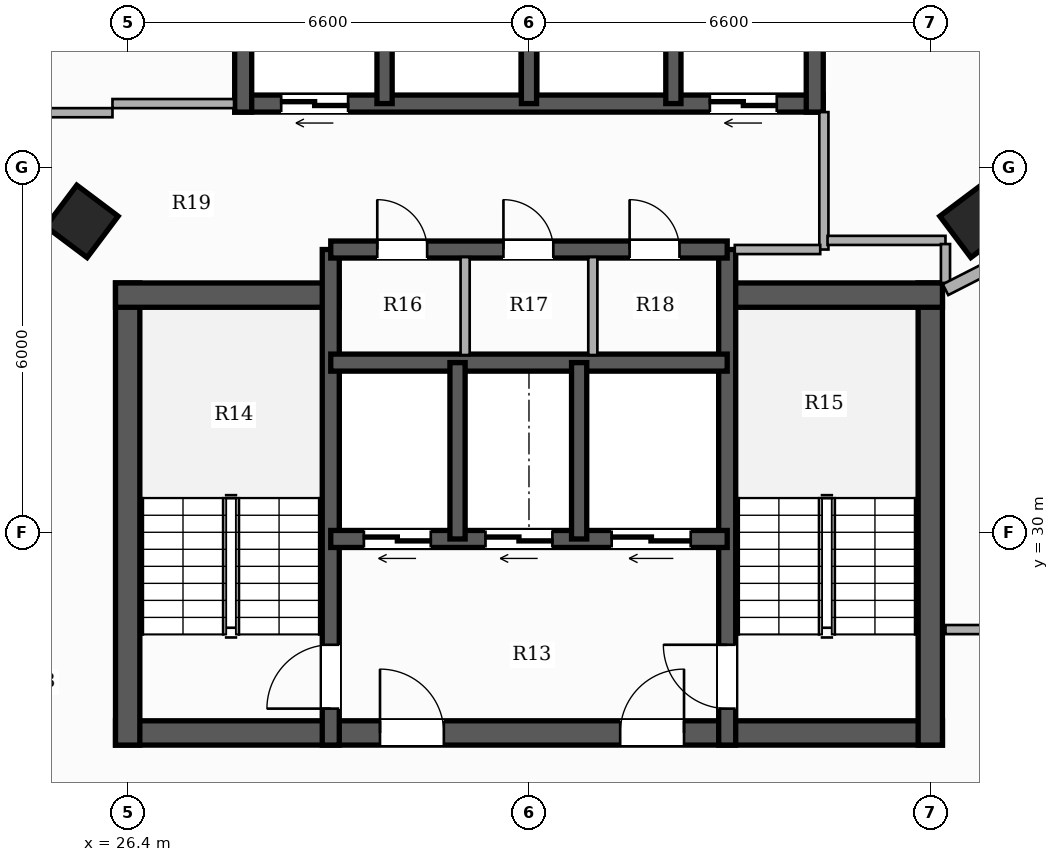
"""IFC4 building model, lengths in metres.
Left out: names, types, materials, properties, quantities, classifications, styles, units other than length and angle.
Written with IfcOpenShell. Run it as: python <this file> out.ifc"""

import sys

from ifc_helpers import new_model, si_unit, direction, frame, frame_2d, origin, origin_2d, place, context, subcontext, project, spatial, rectangle, hollow_rectangle, extrude, element, fill, save


model = new_model("IFC4")
c1 = context("Model", 3, precision=1e-05, world=origin(), true_north=direction((0.0, 1.0)))
c2 = subcontext(c1, "Body", "Model", "MODEL_VIEW")
j1 = project(units=[si_unit("LENGTHUNIT", "METRE"), si_unit("PLANEANGLEUNIT", "RADIAN")], contexts=[c1])
p1 = place(None, origin())
s1 = spatial("IfcSite", under=j1, at=p1, CompositionType="ELEMENT")
p2 = place(p1, origin())
s2 = spatial("IfcBuilding", under=s1, at=p2, CompositionType="ELEMENT")
p3 = place(p2, frame((0.0, 0.0, 126.5)))
s3 = spatial("IfcBuildingStorey", under=s2, at=p3, CompositionType="ELEMENT", Elevation=126.5)
p4 = place(p3, frame((26.2, 26.7, 0.0), z_axis=(0.0, 0.0, 1.0), x_axis=(1.0, 0.0, 0.0)))
e1 = element("IfcWall", 1, at=p4, inside=s3, PredefinedType="SHEAR", context=c2, shape_type="SweptSolid", body=[
    extrude(rectangle(XDim=13.6, YDim=0.4, at=frame_2d((6.8, 0.0))), origin(), (0.0, 0.0, 1.0), 3.3),
])
p5 = place(p4, frame((4.35, 0.0, 0.0)))
e2 = element("IfcOpeningElement", 2, at=p5, cuts=e1, PredefinedType="OPENING", context=c2, shape_type="SweptSolid", body=[
    extrude(rectangle(XDim=1.05, YDim=2.15, at=frame_2d((0.525, 1.075))), frame((0.0, 0.21, 0.0), z_axis=(0.0, -1.0, 0.0), x_axis=(1.0, 0.0, 0.0)), (0.0, 0.0, 1.0), 0.42),
])
p6 = place(p4, frame((8.3, 0.0, 0.0)))
e3 = element("IfcOpeningElement", 3, at=p6, cuts=e1, PredefinedType="OPENING", context=c2, shape_type="SweptSolid", body=[
    extrude(rectangle(XDim=1.05, YDim=2.15, at=frame_2d((0.525, 1.075))), frame((0.0, 0.21, 0.0), z_axis=(0.0, -1.0, 0.0), x_axis=(1.0, 0.0, 0.0)), (0.0, 0.0, 1.0), 0.42),
])
p7 = place(p3, frame((26.4, 26.5, 0.0), z_axis=(0.0, 0.0, 1.0), x_axis=(0.0, 1.0, 0.0)))
e4 = element("IfcWall", 4, at=p7, inside=s3, PredefinedType="SHEAR", context=c2, shape_type="SweptSolid", body=[
    extrude(rectangle(XDim=7.6, YDim=0.4, at=frame_2d((3.8, 0.0))), origin(), (0.0, 0.0, 1.0), 3.3),
])
p8 = place(p3, frame((26.2, 33.9, 0.0), z_axis=(0.0, 0.0, 1.0), x_axis=(1.0, 0.0, 0.0)))
e5 = element("IfcWall", 5, at=p8, inside=s3, PredefinedType="SHEAR", context=c2, shape_type="SweptSolid", body=[
    extrude(rectangle(XDim=3.68, YDim=0.4, at=frame_2d((1.84, 0.0))), origin(), (0.0, 0.0, 1.0), 3.3),
])
p9 = place(p3, frame((39.6, 26.5, 0.0), z_axis=(0.0, 0.0, 1.0), x_axis=(0.0, 1.0, 0.0)))
e6 = element("IfcWall", 6, at=p9, inside=s3, PredefinedType="SHEAR", context=c2, shape_type="SweptSolid", body=[
    extrude(rectangle(XDim=7.6, YDim=0.4, at=frame_2d((3.8, 0.0))), origin(), (0.0, 0.0, 1.0), 3.3),
])
p10 = place(p3, frame((36.12, 33.9, 0.0), z_axis=(0.0, 0.0, 1.0), x_axis=(1.0, 0.0, 0.0)))
e7 = element("IfcWall", 7, at=p10, inside=s3, PredefinedType="SHEAR", context=c2, shape_type="SweptSolid", body=[
    extrude(rectangle(XDim=3.68, YDim=0.4, at=frame_2d((1.84, 0.0))), origin(), (0.0, 0.0, 1.0), 3.3),
])
p11 = place(p3, frame((29.74, 26.5, 0.0), z_axis=(0.0, 0.0, 1.0), x_axis=(0.0, 1.0, 0.0)))
e8 = element("IfcWall", 8, at=p11, inside=s3, PredefinedType="SHEAR", context=c2, shape_type="SweptSolid", body=[
    extrude(rectangle(XDim=8.15, YDim=0.28, at=frame_2d((4.075, 0.0))), origin(), (0.0, 0.0, 1.0), 3.3),
])
p12 = place(p11, frame((0.6, 0.0, 0.0)))
e9 = element("IfcOpeningElement", 9, at=p12, cuts=e8, PredefinedType="OPENING", context=c2, shape_type="SweptSolid", body=[
    extrude(rectangle(XDim=1.05, YDim=2.15, at=frame_2d((0.525, 1.075))), frame((0.0, 0.15, 0.0), z_axis=(0.0, -1.0, 0.0), x_axis=(1.0, 0.0, 0.0)), (0.0, 0.0, 1.0), 0.3),
])
p13 = place(p3, frame((36.26, 26.5, 0.0), z_axis=(0.0, 0.0, 1.0), x_axis=(0.0, 1.0, 0.0)))
e10 = element("IfcWall", 10, at=p13, inside=s3, PredefinedType="SHEAR", context=c2, shape_type="SweptSolid", body=[
    extrude(rectangle(XDim=8.15, YDim=0.28, at=frame_2d((4.075, 0.0))), origin(), (0.0, 0.0, 1.0), 3.3),
])
p14 = place(p13, frame((0.6, 0.0, 0.0)))
e11 = element("IfcOpeningElement", 11, at=p14, cuts=e10, PredefinedType="OPENING", context=c2, shape_type="SweptSolid", body=[
    extrude(rectangle(XDim=1.05, YDim=2.15, at=frame_2d((0.525, 1.075))), frame((0.0, 0.15, 0.0), z_axis=(0.0, -1.0, 0.0), x_axis=(1.0, 0.0, 0.0)), (0.0, 0.0, 1.0), 0.3),
])
p15 = place(p3, frame((36.26, 29.89, 0.0), z_axis=(0.0, 0.0, 1.0), x_axis=(-1.0, 0.0, 0.0)))
e12 = element("IfcWall", 12, at=p15, inside=s3, PredefinedType="SHEAR", context=c2, shape_type="SweptSolid", body=[
    extrude(rectangle(XDim=6.52, YDim=0.28, at=frame_2d((3.26, 0.0))), origin(), (0.0, 0.0, 1.0), 3.3),
])
p16 = place(p15, frame((4.875, 0.0, 0.0)))
e13 = element("IfcOpeningElement", 13, at=p16, cuts=e12, PredefinedType="OPENING", context=c2, shape_type="SweptSolid", body=[
    extrude(rectangle(XDim=1.1, YDim=2.2, at=frame_2d((0.55, 1.1))), frame((0.0, 0.15, 0.0), z_axis=(0.0, -1.0, 0.0), x_axis=(1.0, 0.0, 0.0)), (0.0, 0.0, 1.0), 0.3),
])
p17 = place(p15, frame((2.875, 0.0, 0.0)))
e14 = element("IfcOpeningElement", 14, at=p17, cuts=e12, PredefinedType="OPENING", context=c2, shape_type="SweptSolid", body=[
    extrude(rectangle(XDim=1.1, YDim=2.2, at=frame_2d((0.55, 1.1))), frame((0.0, 0.15, 0.0), z_axis=(0.0, -1.0, 0.0), x_axis=(1.0, 0.0, 0.0)), (0.0, 0.0, 1.0), 0.3),
])
p18 = place(p15, frame((0.6, 0.0, 0.0)))
e15 = element("IfcOpeningElement", 15, at=p18, cuts=e12, PredefinedType="OPENING", context=c2, shape_type="SweptSolid", body=[
    extrude(rectangle(XDim=1.3, YDim=2.2, at=frame_2d((0.65, 1.1))), frame((0.0, 0.15, 0.0), z_axis=(0.0, -1.0, 0.0), x_axis=(1.0, 0.0, 0.0)), (0.0, 0.0, 1.0), 0.3),
])
p19 = place(p3, frame((29.74, 32.79, 0.0), z_axis=(0.0, 0.0, 1.0), x_axis=(1.0, 0.0, 0.0)))
e16 = element("IfcWall", 16, at=p19, inside=s3, PredefinedType="SHEAR", context=c2, shape_type="SweptSolid", body=[
    extrude(rectangle(XDim=6.52, YDim=0.28, at=frame_2d((3.26, 0.0))), origin(), (0.0, 0.0, 1.0), 3.3),
])
for number, where, z_axis, x_axis in (
    (17, (31.825, 29.89, 0.0), (0.0, 0.0, 1.0), (0.0, 1.0, 0.0)),
    (18, (33.825, 29.89, 0.0), (0.0, 0.0, 1.0), (0.0, 1.0, 0.0)),
):
    element("IfcWall", number, at=place(p3, frame(where, z_axis=z_axis, x_axis=x_axis)), inside=s3, PredefinedType="SHEAR", context=c2, shape_type="SweptSolid", body=[
        extrude(rectangle(XDim=2.9, YDim=0.25, at=frame_2d((1.45, 0.0))), origin(), (0.0, 0.0, 1.0), 3.3),
    ])
p20 = place(p3, frame((29.74, 34.65, 0.0), z_axis=(0.0, 0.0, 1.0), x_axis=(1.0, 0.0, 0.0)))
e19 = element("IfcWall", 19, at=p20, inside=s3, PredefinedType="SHEAR", context=c2, shape_type="SweptSolid", body=[
    extrude(rectangle(XDim=6.52, YDim=0.28, at=frame_2d((3.26, 0.0))), origin(), (0.0, 0.0, 1.0), 3.3),
])
p21 = place(p20, frame((0.765, 0.0, 0.0)))
e20 = element("IfcOpeningElement", 20, at=p21, cuts=e19, PredefinedType="OPENING", context=c2, shape_type="SweptSolid", body=[
    extrude(rectangle(XDim=0.82, YDim=2.1, at=frame_2d((0.41, 1.05))), frame((0.0, 0.15, 0.0), z_axis=(0.0, -1.0, 0.0), x_axis=(1.0, 0.0, 0.0)), (0.0, 0.0, 1.0), 0.3),
])
p22 = place(p20, frame((2.84, 0.0, 0.0)))
e21 = element("IfcOpeningElement", 21, at=p22, cuts=e19, PredefinedType="OPENING", context=c2, shape_type="SweptSolid", body=[
    extrude(rectangle(XDim=0.82, YDim=2.1, at=frame_2d((0.41, 1.05))), frame((0.0, 0.15, 0.0), z_axis=(0.0, -1.0, 0.0), x_axis=(1.0, 0.0, 0.0)), (0.0, 0.0, 1.0), 0.3),
])
p23 = place(p20, frame((4.915, 0.0, 0.0)))
e22 = element("IfcOpeningElement", 22, at=p23, cuts=e19, PredefinedType="OPENING", context=c2, shape_type="SweptSolid", body=[
    extrude(rectangle(XDim=0.82, YDim=2.1, at=frame_2d((0.41, 1.05))), frame((0.0, 0.15, 0.0), z_axis=(0.0, -1.0, 0.0), x_axis=(1.0, 0.0, 0.0)), (0.0, 0.0, 1.0), 0.3),
])
p24 = place(p3, frame((37.84, 37.05, 0.0), z_axis=(0.0, 0.0, 1.0), x_axis=(-1.0, 0.0, 0.0)))
e23 = element("IfcWall", 23, at=p24, inside=s3, PredefinedType="SHEAR", context=c2, shape_type="SweptSolid", body=[
    extrude(rectangle(XDim=9.68, YDim=0.28, at=frame_2d((4.84, 0.0))), origin(), (0.0, 0.0, 1.0), 3.3),
])
p25 = place(p24, frame((7.815, 0.0, 0.0)))
e24 = element("IfcOpeningElement", 24, at=p25, cuts=e23, PredefinedType="OPENING", context=c2, shape_type="SweptSolid", body=[
    extrude(rectangle(XDim=1.1, YDim=2.2, at=frame_2d((0.55, 1.1))), frame((0.0, 0.15, 0.0), z_axis=(0.0, -1.0, 0.0), x_axis=(1.0, 0.0, 0.0)), (0.0, 0.0, 1.0), 0.3),
])
p26 = place(p24, frame((0.765, 0.0, 0.0)))
e25 = element("IfcOpeningElement", 25, at=p26, cuts=e23, PredefinedType="OPENING", context=c2, shape_type="SweptSolid", body=[
    extrude(rectangle(XDim=1.1, YDim=2.2, at=frame_2d((0.55, 1.1))), frame((0.0, 0.15, 0.0), z_axis=(0.0, -1.0, 0.0), x_axis=(1.0, 0.0, 0.0)), (0.0, 0.0, 1.0), 0.3),
])
for number, where, z_axis, x_axis in (
    (26, (28.3, 36.91, 0.0), (0.0, 0.0, 1.0), (0.0, 1.0, 0.0)),
    (27, (37.7, 36.91, 0.0), (0.0, 0.0, 1.0), (0.0, 1.0, 0.0)),
):
    element("IfcWall", number, at=place(p3, frame(where, z_axis=z_axis, x_axis=x_axis)), inside=s3, PredefinedType="SHEAR", context=c2, shape_type="SweptSolid", body=[
        extrude(rectangle(XDim=2.83, YDim=0.28, at=frame_2d((1.415, 0.0))), origin(), (0.0, 0.0, 1.0), 3.3),
    ])
for number, where, z_axis, x_axis in (
    (28, (30.625, 37.05, 0.0), (0.0, 0.0, 1.0), (0.0, 1.0, 0.0)),
    (29, (33.0, 37.05, 0.0), (0.0, 0.0, 1.0), (0.0, 1.0, 0.0)),
    (30, (35.375, 37.05, 0.0), (0.0, 0.0, 1.0), (0.0, 1.0, 0.0)),
):
    element("IfcWall", number, at=place(p3, frame(where, z_axis=z_axis, x_axis=x_axis)), inside=s3, PredefinedType="SHEAR", context=c2, shape_type="SweptSolid", body=[
        extrude(rectangle(XDim=2.55, YDim=0.25, at=frame_2d((1.275, 0.0))), origin(), (0.0, 0.0, 1.0), 3.3),
    ])
for number, where, z_axis, x_axis in (
    (31, (25.648, 35.113, 0.0), (0.0, 0.0, 1.0), (0.6, 0.8, 0.0)),
    (32, (40.352, 35.113, 0.0), (0.0, 0.0, 1.0), (-0.6, 0.8, 0.0)),
):
    element("IfcColumn", number, at=place(p3, frame(where, z_axis=z_axis, x_axis=x_axis)), inside=s3, PredefinedType="COLUMN", context=c2, shape_type="SweptSolid", body=[
        extrude(hollow_rectangle(XDim=0.85, YDim=0.85, WallThickness=0.028, at=origin_2d()), origin(), (0.0, 0.0, 1.0), 3.3),
    ])
p27 = place(p3, frame((37.85, 34.65, 0.0), z_axis=(0.0, 0.0, 1.0), x_axis=(0.0, 1.0, 0.0)))
e33 = element("IfcWall", 33, at=p27, inside=s3, PredefinedType="PARTITIONING", context=c2, shape_type="SweptSolid", body=[
    extrude(rectangle(XDim=2.26, YDim=0.15, at=frame_2d((1.13, 0.0))), origin(), (0.0, 0.0, 1.0), 3.06),
])
p28 = place(p3, frame((36.385, 34.65, 0.0), z_axis=(0.0, 0.0, 1.0), x_axis=(1.0, 0.0, 0.0)))
e34 = element("IfcWall", 34, at=p28, inside=s3, PredefinedType="PARTITIONING", context=c2, shape_type="SweptSolid", body=[
    extrude(rectangle(XDim=1.405, YDim=0.15, at=frame_2d((0.703, 0.0))), origin(), (0.0, 0.0, 1.0), 2.425),
])
for number, where, z_axis, x_axis in (
    (35, (31.95, 32.915, 0.0), (0.0, 0.0, 1.0), (0.0, 1.0, 0.0)),
    (36, (34.05, 32.915, 0.0), (0.0, 0.0, 1.0), (0.0, 1.0, 0.0)),
):
    element("IfcWall", number, at=place(p3, frame(where, z_axis=z_axis, x_axis=x_axis)), inside=s3, PredefinedType="PARTITIONING", context=c2, shape_type="SweptSolid", body=[
        extrude(rectangle(XDim=1.61, YDim=0.15, at=frame_2d((0.805, 0.0))), origin(), (0.0, 0.0, 1.0), 3.06),
    ])
p29 = place(p3, frame((23.56, 36.9, 0.0), z_axis=(0.0, 0.0, 1.0), x_axis=(1.0, 0.0, 0.0)))
e37 = element("IfcWall", 37, at=p29, inside=s3, PredefinedType="PARTITIONING", context=c2, shape_type="SweptSolid", body=[
    extrude(rectangle(XDim=2.59, YDim=0.15, at=frame_2d((1.295, 0.0))), origin(), (0.0, 0.0, 1.0), 2.413),
])
p30 = place(p29, frame((0.515, 0.0, 0.0)))
e38 = element("IfcOpeningElement", 38, at=p30, cuts=e37, PredefinedType="OPENING", context=c2, shape_type="SweptSolid", body=[
    extrude(rectangle(XDim=0.88, YDim=2.1, at=frame_2d((0.44, 1.05))), frame((0.0, 0.085, 0.0), z_axis=(0.0, -1.0, 0.0), x_axis=(1.0, 0.0, 0.0)), (0.0, 0.0, 1.0), 0.17),
])
p31 = place(p3, frame((39.85, 28.4, 0.0), z_axis=(0.0, 0.0, 1.0), x_axis=(1.0, 0.0, 0.0)))
e39 = element("IfcWall", 39, at=p31, inside=s3, PredefinedType="PARTITIONING", context=c2, shape_type="SweptSolid", body=[
    extrude(rectangle(XDim=2.5, YDim=0.15, at=frame_2d((1.25, 0.0))), origin(), (0.0, 0.0, 1.0), 2.721),
])
p32 = place(p3, frame((26.15, 37.05, 0.0), z_axis=(0.0, 0.0, 1.0), x_axis=(1.0, 0.0, 0.0)))
e40 = element("IfcWall", 40, at=p32, inside=s3, PredefinedType="PARTITIONING", context=c2, shape_type="SweptSolid", body=[
    extrude(rectangle(XDim=2.0, YDim=0.15, at=frame_2d((1.0, 0.0))), origin(), (0.0, 0.0, 1.0), 2.413),
])
p33 = place(p3, frame((37.91, 34.8, 0.0), z_axis=(0.0, 0.0, 1.0), x_axis=(1.0, 0.0, 0.0)))
e41 = element("IfcWall", 41, at=p33, inside=s3, PredefinedType="PARTITIONING", context=c2, shape_type="SweptSolid", body=[
    extrude(rectangle(XDim=1.94, YDim=0.15, at=frame_2d((0.97, 0.0))), origin(), (0.0, 0.0, 1.0), 2.721),
])
p34 = place(p3, frame((39.85, 34.74, 0.0), z_axis=(0.0, 0.0, 1.0), x_axis=(0.0, -1.0, 0.0)))
e42 = element("IfcWall", 42, at=p34, inside=s3, PredefinedType="PARTITIONING", context=c2, shape_type="SweptSolid", body=[
    extrude(rectangle(XDim=0.64, YDim=0.15, at=frame_2d((0.32, 0.0))), origin(), (0.0, 0.0, 1.0), 2.721),
])
p35 = place(p3, frame((44.359, 36.288, 0.0), z_axis=(0.0, 0.0, 1.0), x_axis=(-0.890946333403, -0.454108611453, 0.0)))
e43 = element("IfcWall", 43, at=p35, inside=s3, PredefinedType="PARTITIONING", context=c2, shape_type="SweptSolid", body=[
    extrude(rectangle(XDim=5.061, YDim=0.2, at=frame_2d((2.53, 0.0))), origin(), (0.0, 0.0, 1.0), 2.413),
])
p36 = place(p12, origin())
e44 = element("IfcDoor", 44, at=p36, inside=s3, OperationType="SINGLE_SWING_LEFT", PredefinedType="DOOR", context=c2, shape_type="SweptSolid", body=[
    extrude(rectangle(XDim=1.05, YDim=2.15, at=frame_2d((0.525, 1.075))), frame((0.0, 0.025, 0.0), z_axis=(0.0, -1.0, 0.0), x_axis=(1.0, 0.0, 0.0)), (0.0, 0.0, 1.0), 0.05),
])
fill(e9, e44)
p37 = place(p14, origin())
e45 = element("IfcDoor", 45, at=p37, inside=s3, OperationType="SINGLE_SWING_RIGHT", PredefinedType="DOOR", context=c2, shape_type="SweptSolid", body=[
    extrude(rectangle(XDim=1.05, YDim=2.15, at=frame_2d((0.525, 1.075))), frame((0.0, 0.025, 0.0), z_axis=(0.0, -1.0, 0.0), x_axis=(1.0, 0.0, 0.0)), (0.0, 0.0, 1.0), 0.05),
])
fill(e11, e45)
p38 = place(p5, origin())
e46 = element("IfcDoor", 46, at=p38, inside=s3, OperationType="SINGLE_SWING_LEFT", PredefinedType="DOOR", context=c2, shape_type="SweptSolid", body=[
    extrude(rectangle(XDim=1.05, YDim=2.15, at=frame_2d((0.525, 1.075))), frame((0.0, 0.025, 0.0), z_axis=(0.0, -1.0, 0.0), x_axis=(1.0, 0.0, 0.0)), (0.0, 0.0, 1.0), 0.05),
])
fill(e2, e46)
p39 = place(p6, origin())
e47 = element("IfcDoor", 47, at=p39, inside=s3, OperationType="SINGLE_SWING_RIGHT", PredefinedType="DOOR", context=c2, shape_type="SweptSolid", body=[
    extrude(rectangle(XDim=1.05, YDim=2.15, at=frame_2d((0.525, 1.075))), frame((0.0, 0.025, 0.0), z_axis=(0.0, -1.0, 0.0), x_axis=(1.0, 0.0, 0.0)), (0.0, 0.0, 1.0), 0.05),
])
fill(e3, e47)
p40 = place(p16, origin())
e48 = element("IfcDoor", 48, at=p40, inside=s3, OperationType="DOUBLE_DOOR_SLIDING", PredefinedType="DOOR", context=c2, shape_type="SweptSolid", body=[
    extrude(rectangle(XDim=1.1, YDim=2.2, at=frame_2d((0.55, 1.1))), frame((0.0, 0.025, 0.0), z_axis=(0.0, -1.0, 0.0), x_axis=(1.0, 0.0, 0.0)), (0.0, 0.0, 1.0), 0.05),
])
fill(e13, e48)
p41 = place(p17, origin())
e49 = element("IfcDoor", 49, at=p41, inside=s3, OperationType="DOUBLE_DOOR_SLIDING", PredefinedType="DOOR", context=c2, shape_type="SweptSolid", body=[
    extrude(rectangle(XDim=1.1, YDim=2.2, at=frame_2d((0.55, 1.1))), frame((0.0, 0.025, 0.0), z_axis=(0.0, -1.0, 0.0), x_axis=(1.0, 0.0, 0.0)), (0.0, 0.0, 1.0), 0.05),
])
fill(e14, e49)
p42 = place(p18, origin())
e50 = element("IfcDoor", 50, at=p42, inside=s3, OperationType="DOUBLE_DOOR_SLIDING", PredefinedType="DOOR", context=c2, shape_type="SweptSolid", body=[
    extrude(rectangle(XDim=1.3, YDim=2.2, at=frame_2d((0.65, 1.1))), frame((0.0, 0.025, 0.0), z_axis=(0.0, -1.0, 0.0), x_axis=(1.0, 0.0, 0.0)), (0.0, 0.0, 1.0), 0.05),
])
fill(e15, e50)
p43 = place(p25, origin())
e51 = element("IfcDoor", 51, at=p43, inside=s3, OperationType="DOUBLE_DOOR_SLIDING", PredefinedType="DOOR", context=c2, shape_type="SweptSolid", body=[
    extrude(rectangle(XDim=1.1, YDim=2.2, at=frame_2d((0.55, 1.1))), frame((0.0, 0.025, 0.0), z_axis=(0.0, -1.0, 0.0), x_axis=(1.0, 0.0, 0.0)), (0.0, 0.0, 1.0), 0.05),
])
fill(e24, e51)
p44 = place(p26, origin())
e52 = element("IfcDoor", 52, at=p44, inside=s3, OperationType="DOUBLE_DOOR_SLIDING", PredefinedType="DOOR", context=c2, shape_type="SweptSolid", body=[
    extrude(rectangle(XDim=1.1, YDim=2.2, at=frame_2d((0.55, 1.1))), frame((0.0, 0.025, 0.0), z_axis=(0.0, -1.0, 0.0), x_axis=(1.0, 0.0, 0.0)), (0.0, 0.0, 1.0), 0.05),
])
fill(e25, e52)
p45 = place(p21, origin())
e53 = element("IfcDoor", 53, at=p45, inside=s3, OperationType="SINGLE_SWING_LEFT", PredefinedType="DOOR", context=c2, shape_type="SweptSolid", body=[
    extrude(rectangle(XDim=0.82, YDim=2.1, at=frame_2d((0.41, 1.05))), frame((0.0, 0.025, 0.0), z_axis=(0.0, -1.0, 0.0), x_axis=(1.0, 0.0, 0.0)), (0.0, 0.0, 1.0), 0.05),
])
fill(e20, e53)
p46 = place(p22, origin())
e54 = element("IfcDoor", 54, at=p46, inside=s3, OperationType="SINGLE_SWING_LEFT", PredefinedType="DOOR", context=c2, shape_type="SweptSolid", body=[
    extrude(rectangle(XDim=0.82, YDim=2.1, at=frame_2d((0.41, 1.05))), frame((0.0, 0.025, 0.0), z_axis=(0.0, -1.0, 0.0), x_axis=(1.0, 0.0, 0.0)), (0.0, 0.0, 1.0), 0.05),
])
fill(e21, e54)
p47 = place(p23, origin())
e55 = element("IfcDoor", 55, at=p47, inside=s3, OperationType="SINGLE_SWING_LEFT", PredefinedType="DOOR", context=c2, shape_type="SweptSolid", body=[
    extrude(rectangle(XDim=0.82, YDim=2.1, at=frame_2d((0.41, 1.05))), frame((0.0, 0.025, 0.0), z_axis=(0.0, -1.0, 0.0), x_axis=(1.0, 0.0, 0.0)), (0.0, 0.0, 1.0), 0.05),
])
fill(e22, e55)
save(model, sys.argv[1])
